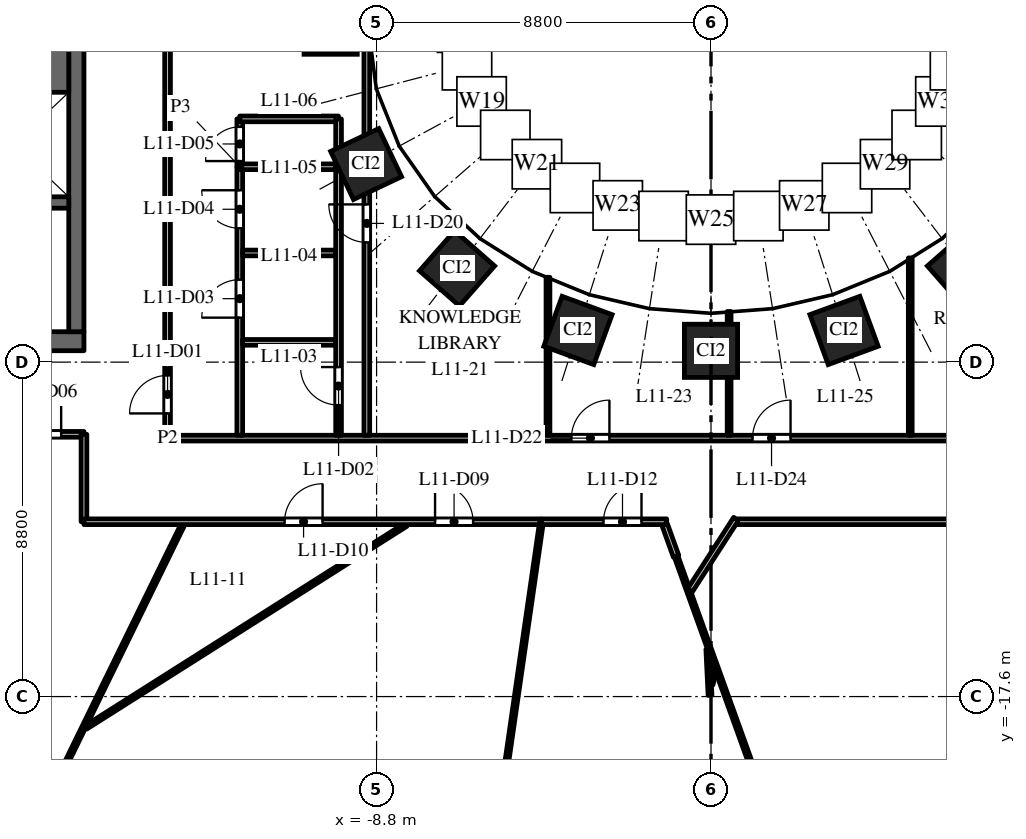
"""IFC4 building model, lengths in metres.
Left out: names, types, materials, properties, quantities, classifications, styles, units other than length and angle.
Written with IfcOpenShell. Run it as: python <this file> out.ifc"""

import sys

from ifc_helpers import new_model, si_unit, direction, frame, frame_2d, origin, origin_2d, place, context, subcontext, project, spatial, rectangle, extrude, element, fill, save


model = new_model("IFC4")
c1 = context("Model", 3, precision=1e-05, world=origin(), true_north=direction((0.0, 1.0)))
c2 = subcontext(c1, "Body", "Model", "MODEL_VIEW")
j1 = project(units=[si_unit("LENGTHUNIT", "METRE"), si_unit("PLANEANGLEUNIT", "RADIAN")], contexts=[c1])
p1 = place(None, origin())
s1 = spatial("IfcSite", under=j1, at=p1, CompositionType="ELEMENT")
p2 = place(p1, origin())
s2 = spatial("IfcBuilding", under=s1, at=p2, CompositionType="ELEMENT")
p3 = place(p2, frame((0.0, 0.0, 54.5)))
s3 = spatial("IfcBuildingStorey", under=s2, at=p3, CompositionType="ELEMENT", Elevation=54.5)
for number, where, z_axis, x_axis in (
    (1, (-10.008, 0.0, 0.0), (0.0, 0.0, 1.0), (0.0, -1.0, 0.0)),
    (2, (-9.076, -3.588, 0.0), (0.0, 0.0, 1.0), (0.429, -0.903, 0.0)),
    (3, (-6.682, -6.334, 0.0), (0.0, 0.0, 1.0), (0.751, -0.66, 0.0)),
    (4, (-3.501, -7.967, 0.0), (0.0, 0.0, 1.0), (0.939, -0.344, 0.0)),
    (5, (0.0, -8.503, 0.0), (0.0, 0.0, 1.0), (1.0, 0.0, 0.0)),
    (6, (3.501, -7.967, 0.0), (0.0, 0.0, 1.0), (0.939, 0.344, 0.0)),
    (7, (6.682, -6.334, 0.0), (0.0, 0.0, 1.0), (0.751, 0.66, 0.0)),
):
    element("IfcColumn", number, at=place(p3, frame(where, z_axis=z_axis, x_axis=x_axis)), inside=s3, PredefinedType="COLUMN", context=c2, shape_type="SweptSolid", body=[
        extrude(rectangle(XDim=1.4, YDim=1.4, at=origin_2d()), origin(), (0.0, 0.0, 1.0), 4.0),
    ])
p4 = place(p3, frame((-16.5, -8.25, 0.0), z_axis=(0.0, 0.0, 1.0), x_axis=(-1.0, 0.0, 0.0)))
e8 = element("IfcWall", 8, at=p4, inside=s3, PredefinedType="SHEAR", context=c2, shape_type="SweptSolid", body=[
    extrude(rectangle(XDim=15.0, YDim=0.5, at=frame_2d((7.5, 0.0))), origin(), (0.0, 0.0, 1.0), 3.7),
])
p5 = place(p4, frame((6.9, 0.0, 0.0)))
e9 = element("IfcOpeningElement", 9, at=p5, cuts=e8, PredefinedType="OPENING", context=c2, shape_type="SweptSolid", body=[
    extrude(rectangle(XDim=1.2, YDim=2.1, at=frame_2d((0.6, 1.05))), frame((0.0, 0.26, 0.0), z_axis=(0.0, -1.0, 0.0), x_axis=(1.0, 0.0, 0.0)), (0.0, 0.0, 1.0), 0.52),
])
p6 = place(p4, frame((12.05, 0.0, 0.0)))
e10 = element("IfcOpeningElement", 10, at=p6, cuts=e8, PredefinedType="OPENING", context=c2, shape_type="SweptSolid", body=[
    extrude(rectangle(XDim=0.9, YDim=2.1, at=frame_2d((0.45, 1.05))), frame((0.0, 0.26, 0.0), z_axis=(0.0, -1.0, 0.0), x_axis=(1.0, 0.0, 0.0)), (0.0, 0.0, 1.0), 0.52),
])
p7 = place(p3, frame((-16.7, -8.0, 0.0), z_axis=(0.0, 0.0, 1.0), x_axis=(0.0, 1.0, 0.0)))
e11 = element("IfcWall", 11, at=p7, inside=s3, PredefinedType="SHEAR", context=c2, shape_type="SweptSolid", body=[
    extrude(rectangle(XDim=16.0, YDim=0.4, at=frame_2d((8.0, 0.0))), origin(), (0.0, 0.0, 1.0), 3.7),
])
p8 = place(p3, frame((-16.9, -1.075, 0.0), z_axis=(0.0, 0.0, 1.0), x_axis=(-1.0, 0.0, 0.0)))
e12 = element("IfcWall", 12, at=p8, inside=s3, PredefinedType="SHEAR", context=c2, shape_type="SweptSolid", body=[
    extrude(rectangle(XDim=2.9, YDim=1.25, at=frame_2d((1.45, 0.0))), origin(), (0.0, 0.0, 1.0), 3.7),
])
p9 = place(p3, frame((-16.9, -4.6, 0.0), z_axis=(0.0, 0.0, 1.0), x_axis=(-1.0, 0.0, 0.0)))
e13 = element("IfcWall", 13, at=p9, inside=s3, PredefinedType="SHEAR", context=c2, shape_type="SweptSolid", body=[
    extrude(rectangle(XDim=6.18, YDim=0.3, at=frame_2d((3.09, 0.0))), origin(), (0.0, 0.0, 1.0), 3.7),
])
p10 = place(p9, frame((4.9, 0.0, 0.0)))
e14 = element("IfcOpeningElement", 14, at=p10, cuts=e13, PredefinedType="OPENING", context=c2, shape_type="SweptSolid", body=[
    extrude(rectangle(XDim=1.1, YDim=2.1, at=frame_2d((0.55, 1.05))), frame((0.0, 0.16, 0.0), z_axis=(0.0, -1.0, 0.0), x_axis=(1.0, 0.0, 0.0)), (0.0, 0.0, 1.0), 0.32),
])
p11 = place(p3, frame((-31.5, -10.7, 0.0), z_axis=(0.0, 0.0, 1.0), x_axis=(1.0, 0.0, 0.0)))
e15 = element("IfcWall", 15, at=p11, inside=s3, PredefinedType="PARTITIONING", context=c2, shape_type="SweptSolid", body=[
    extrude(rectangle(XDim=15.0, YDim=0.15, at=frame_2d((7.5, 0.0))), origin(), (0.0, 0.0, 1.0), 3.1),
])
p12 = place(p11, frame((13.4, 0.0, 0.0)))
e16 = element("IfcOpeningElement", 16, at=p12, cuts=e15, PredefinedType="OPENING", context=c2, shape_type="SweptSolid", body=[
    extrude(rectangle(XDim=1.0, YDim=2.1, at=frame_2d((0.5, 1.05))), frame((0.0, 0.085, 0.0), z_axis=(0.0, -1.0, 0.0), x_axis=(1.0, 0.0, 0.0)), (0.0, 0.0, 1.0), 0.17),
])
p13 = place(p3, frame((-19.086, -23.685, 0.0), z_axis=(0.0, 0.0, 1.0), x_axis=(0.439199750603, 0.898389436197, 0.0)))
e17 = element("IfcWall", 17, at=p13, inside=s3, PredefinedType="PARTITIONING", context=c2, shape_type="SweptSolid", body=[
    extrude(rectangle(XDim=11.81, YDim=0.1, at=frame_2d((5.905, 0.0))), origin(), (0.0, 0.0, 1.0), 3.7),
])
p14 = place(p3, frame((-16.452, -18.412, 0.0), z_axis=(0.0, 0.0, 1.0), x_axis=(0.84481391066, 0.535060236194, 0.0)))
e18 = element("IfcWall", 18, at=p14, inside=s3, PredefinedType="PARTITIONING", context=c2, shape_type="SweptSolid", body=[
    extrude(rectangle(XDim=9.971, YDim=0.1, at=frame_2d((4.986, 0.0))), origin(), (0.0, 0.0, 1.0), 2.85),
])
p15 = place(p3, frame((-16.5, -13.0, 0.0), z_axis=(0.0, 0.0, 1.0), x_axis=(0.0, 1.0, 0.0)))
e19 = element("IfcWall", 19, at=p15, inside=s3, PredefinedType="PARTITIONING", context=c2, shape_type="SweptSolid", body=[
    extrude(rectangle(XDim=2.3, YDim=0.15, at=frame_2d((1.15, 0.0))), origin(), (0.0, 0.0, 1.0), 2.75),
])
p16 = place(p3, frame((-16.5, -13.0, 0.0), z_axis=(0.0, 0.0, 1.0), x_axis=(1.0, 0.0, 0.0)))
e20 = element("IfcWall", 20, at=p16, inside=s3, PredefinedType="PARTITIONING", context=c2, shape_type="SweptSolid", body=[
    extrude(rectangle(XDim=12.021, YDim=0.15, at=frame_2d((6.01, 0.0))), origin(), (0.0, 0.0, 1.0), 2.85),
])
p17 = place(p16, frame((9.239, 0.0, 0.0)))
e21 = element("IfcOpeningElement", 21, at=p17, cuts=e20, PredefinedType="OPENING", context=c2, shape_type="SweptSolid", body=[
    extrude(rectangle(XDim=1.0, YDim=2.1, at=frame_2d((0.5, 1.05))), frame((0.0, 0.085, 0.0), z_axis=(0.0, -1.0, 0.0), x_axis=(1.0, 0.0, 0.0)), (0.0, 0.0, 1.0), 0.17),
])
p18 = place(p16, frame((5.279, 0.0, 0.0)))
e22 = element("IfcOpeningElement", 22, at=p18, cuts=e20, PredefinedType="OPENING", context=c2, shape_type="SweptSolid", body=[
    extrude(rectangle(XDim=1.0, YDim=2.1, at=frame_2d((0.5, 1.05))), frame((0.0, 0.085, 0.0), z_axis=(0.0, -1.0, 0.0), x_axis=(1.0, 0.0, 0.0)), (0.0, 0.0, 1.0), 0.17),
])
p19 = place(p3, frame((-14.3, -10.8, 0.0), z_axis=(0.0, 0.0, 1.0), x_axis=(0.0, 1.0, 0.0)))
e23 = element("IfcWall", 23, at=p19, inside=s3, PredefinedType="PARTITIONING", context=c2, shape_type="SweptSolid", body=[
    extrude(rectangle(XDim=21.6, YDim=0.15, at=frame_2d((10.8, 0.0))), origin(), (0.0, 0.0, 1.0), 2.75),
])
p20 = place(p19, frame((0.65, 0.0, 0.0)))
e24 = element("IfcOpeningElement", 24, at=p20, cuts=e23, PredefinedType="OPENING", context=c2, shape_type="SweptSolid", body=[
    extrude(rectangle(XDim=1.0, YDim=2.1, at=frame_2d((0.5, 1.05))), frame((0.0, 0.085, 0.0), z_axis=(0.0, -1.0, 0.0), x_axis=(1.0, 0.0, 0.0)), (0.0, 0.0, 1.0), 0.17),
])
p21 = place(p3, frame((-14.3, -10.8, 0.0), z_axis=(0.0, 0.0, 1.0), x_axis=(1.0, 0.0, 0.0)))
e25 = element("IfcWall", 25, at=p21, inside=s3, PredefinedType="PARTITIONING", context=c2, shape_type="SweptSolid", body=[
    extrude(rectangle(XDim=28.6, YDim=0.15, at=frame_2d((14.3, 0.0))), origin(), (0.0, 0.0, 1.0), 2.85),
])
p22 = place(p21, frame((10.627, 0.0, 0.0)))
e26 = element("IfcOpeningElement", 26, at=p22, cuts=e25, PredefinedType="OPENING", context=c2, shape_type="SweptSolid", body=[
    extrude(rectangle(XDim=1.0, YDim=2.1, at=frame_2d((0.5, 1.05))), frame((0.0, 0.085, 0.0), z_axis=(0.0, -1.0, 0.0), x_axis=(1.0, 0.0, 0.0)), (0.0, 0.0, 1.0), 0.17),
])
p23 = place(p21, frame((15.393, 0.0, 0.0)))
e27 = element("IfcOpeningElement", 27, at=p23, cuts=e25, PredefinedType="OPENING", context=c2, shape_type="SweptSolid", body=[
    extrude(rectangle(XDim=1.0, YDim=2.1, at=frame_2d((0.5, 1.05))), frame((0.0, 0.085, 0.0), z_axis=(0.0, -1.0, 0.0), x_axis=(1.0, 0.0, 0.0)), (0.0, 0.0, 1.0), 0.17),
])
p24 = place(p3, frame((-12.4, -10.725, 0.0), z_axis=(0.0, 0.0, 1.0), x_axis=(0.0, 1.0, 0.0)))
e28 = element("IfcWall", 28, at=p24, inside=s3, PredefinedType="PARTITIONING", context=c2, shape_type="SweptSolid", body=[
    extrude(rectangle(XDim=7.065, YDim=0.15, at=frame_2d((3.533, 0.0))), origin(), (0.0, 0.0, 1.0), 2.75),
])
p25 = place(p24, frame((3.095, 0.0, 0.0)))
e29 = element("IfcOpeningElement", 29, at=p25, cuts=e28, PredefinedType="OPENING", context=c2, shape_type="SweptSolid", body=[
    extrude(rectangle(XDim=1.0, YDim=2.1, at=frame_2d((0.5, 1.05))), frame((0.0, 0.085, 0.0), z_axis=(0.0, -1.0, 0.0), x_axis=(1.0, 0.0, 0.0)), (0.0, 0.0, 1.0), 0.17),
])
p26 = place(p24, frame((5.447, 0.0, 0.0)))
e30 = element("IfcOpeningElement", 30, at=p26, cuts=e28, PredefinedType="OPENING", context=c2, shape_type="SweptSolid", body=[
    extrude(rectangle(XDim=1.0, YDim=2.1, at=frame_2d((0.5, 1.05))), frame((0.0, 0.085, 0.0), z_axis=(0.0, -1.0, 0.0), x_axis=(1.0, 0.0, 0.0)), (0.0, 0.0, 1.0), 0.17),
])
p27 = place(p3, frame((-12.325, -8.28, 0.0), z_axis=(0.0, 0.0, 1.0), x_axis=(1.0, 0.0, 0.0)))
e31 = element("IfcWall", 31, at=p27, inside=s3, PredefinedType="PARTITIONING", context=c2, shape_type="SweptSolid", body=[
    extrude(rectangle(XDim=2.45, YDim=0.15, at=frame_2d((1.225, 0.0))), origin(), (0.0, 0.0, 1.0), 2.75),
])
p28 = place(p3, frame((-12.325, -5.928, 0.0), z_axis=(0.0, 0.0, 1.0), x_axis=(1.0, 0.0, 0.0)))
e32 = element("IfcWall", 32, at=p28, inside=s3, PredefinedType="PARTITIONING", context=c2, shape_type="SweptSolid", body=[
    extrude(rectangle(XDim=2.45, YDim=0.15, at=frame_2d((1.225, 0.0))), origin(), (0.0, 0.0, 1.0), 3.7),
])
p29 = place(p3, frame((-12.4, -3.66, 0.0), z_axis=(0.0, 0.0, 1.0), x_axis=(0.0, 1.0, 0.0)))
e33 = element("IfcWall", 33, at=p29, inside=s3, PredefinedType="PARTITIONING", context=c2, shape_type="SweptSolid", body=[
    extrude(rectangle(XDim=1.26, YDim=0.15, at=frame_2d((0.63, 0.0))), origin(), (0.0, 0.0, 1.0), 3.7),
])
p30 = place(p29, frame((0.15, 0.0, 0.0)))
e34 = element("IfcOpeningElement", 34, at=p30, cuts=e33, PredefinedType="OPENING", context=c2, shape_type="SweptSolid", body=[
    extrude(rectangle(XDim=0.9, YDim=2.1, at=frame_2d((0.45, 1.05))), frame((0.0, 0.085, 0.0), z_axis=(0.0, -1.0, 0.0), x_axis=(1.0, 0.0, 0.0)), (0.0, 0.0, 1.0), 0.17),
])
p31 = place(p3, frame((-12.4, -3.66, 0.0), z_axis=(0.0, 0.0, 1.0), x_axis=(1.0, 0.0, 0.0)))
e35 = element("IfcWall", 35, at=p31, inside=s3, PredefinedType="PARTITIONING", context=c2, shape_type="SweptSolid", body=[
    extrude(rectangle(XDim=2.6, YDim=0.15, at=frame_2d((1.3, 0.0))), origin(), (0.0, 0.0, 1.0), 3.7),
])
p32 = place(p3, frame((-12.4, -2.4, 0.0), z_axis=(0.0, 0.0, 1.0), x_axis=(1.0, 0.0, 0.0)))
e36 = element("IfcWall", 36, at=p32, inside=s3, PredefinedType="PARTITIONING", context=c2, shape_type="SweptSolid", body=[
    extrude(rectangle(XDim=2.596, YDim=0.15, at=frame_2d((1.298, 0.0))), origin(), (0.0, 0.0, 1.0), 3.7),
])
p33 = place(p3, frame((-9.8, -10.725, 0.0), z_axis=(0.0, 0.0, 1.0), x_axis=(0.0, 1.0, 0.0)))
e37 = element("IfcWall", 37, at=p33, inside=s3, PredefinedType="PARTITIONING", context=c2, shape_type="SweptSolid", body=[
    extrude(rectangle(XDim=7.065, YDim=0.15, at=frame_2d((3.533, 0.0))), origin(), (0.0, 0.0, 1.0), 2.75),
])
p34 = place(p33, frame((0.795, 0.0, 0.0)))
e38 = element("IfcOpeningElement", 38, at=p34, cuts=e37, PredefinedType="OPENING", context=c2, shape_type="SweptSolid", body=[
    extrude(rectangle(XDim=1.0, YDim=2.1, at=frame_2d((0.5, 1.05))), frame((0.0, 0.085, 0.0), z_axis=(0.0, -1.0, 0.0), x_axis=(1.0, 0.0, 0.0)), (0.0, 0.0, 1.0), 0.17),
])
p35 = place(p3, frame((-9.8, -3.66, 0.0), z_axis=(0.0, 0.0, 1.0), x_axis=(0.0, 1.0, 0.0)))
e39 = element("IfcWall", 39, at=p35, inside=s3, PredefinedType="PARTITIONING", context=c2, shape_type="SweptSolid", body=[
    extrude(rectangle(XDim=1.256, YDim=0.15, at=frame_2d((0.628, 0.0))), origin(), (0.0, 0.0, 1.0), 3.7),
])
p36 = place(p3, frame((-9.057, -10.725, 0.0), z_axis=(0.0, 0.0, 1.0), x_axis=(0.0, 1.0, 0.0)))
e40 = element("IfcWall", 40, at=p36, inside=s3, PredefinedType="PARTITIONING", context=c2, shape_type="SweptSolid", body=[
    extrude(rectangle(XDim=10.68, YDim=0.15, at=frame_2d((5.34, 0.0))), origin(), (0.0, 0.0, 1.0), 2.75),
])
p37 = place(p36, frame((5.075, 0.0, 0.0)))
e41 = element("IfcOpeningElement", 41, at=p37, cuts=e40, PredefinedType="OPENING", context=c2, shape_type="SweptSolid", body=[
    extrude(rectangle(XDim=1.0, YDim=2.1, at=frame_2d((0.5, 1.05))), frame((0.0, 0.085, 0.0), z_axis=(0.0, -1.0, 0.0), x_axis=(1.0, 0.0, 0.0)), (0.0, 0.0, 1.0), 0.17),
])
p38 = place(p3, frame((-5.905, -23.005, 0.0), z_axis=(0.0, 0.0, 1.0), x_axis=(0.143007570509, 0.98972159458, 0.0)))
e42 = element("IfcWall", 42, at=p38, inside=s3, PredefinedType="PARTITIONING", context=c2, shape_type="SweptSolid", body=[
    extrude(rectangle(XDim=10.105, YDim=0.1, at=frame_2d((5.052, 0.0))), origin(), (0.0, 0.0, 1.0), 3.7),
])
p39 = place(p3, frame((-4.459, -13.0, 0.0), z_axis=(0.0, 0.0, 1.0), x_axis=(1.0, 0.0, 0.0)))
e43 = element("IfcWall", 43, at=p39, inside=s3, PredefinedType="PARTITIONING", context=c2, shape_type="SweptSolid", body=[
    extrude(rectangle(XDim=3.293, YDim=0.15, at=frame_2d((1.646, 0.0))), origin(), (0.0, 0.0, 1.0), 3.7),
])
p40 = place(p39, frame((1.63, 0.0, 0.0)))
e44 = element("IfcOpeningElement", 44, at=p40, cuts=e43, PredefinedType="OPENING", context=c2, shape_type="SweptSolid", body=[
    extrude(rectangle(XDim=1.0, YDim=2.1, at=frame_2d((0.5, 1.05))), frame((0.0, 0.085, 0.0), z_axis=(0.0, -1.0, 0.0), x_axis=(1.0, 0.0, 0.0)), (0.0, 0.0, 1.0), 0.17),
])
p41 = place(p3, frame((-4.29, -10.725, 0.0), z_axis=(0.0, 0.0, 1.0), x_axis=(0.0, 1.0, 0.0)))
e45 = element("IfcWall", 45, at=p41, inside=s3, PredefinedType="PARTITIONING", context=c2, shape_type="SweptSolid", body=[
    extrude(rectangle(XDim=4.157, YDim=0.1, at=frame_2d((2.079, 0.0))), origin(), (0.0, 0.0, 1.0), 2.85),
])
p42 = place(p3, frame((-1.218, -13.079, 0.0), z_axis=(0.0, 0.0, 1.0), x_axis=(0.339052677967, -0.940767389722, 0.0)))
e46 = element("IfcWall", 46, at=p42, inside=s3, PredefinedType="PARTITIONING", context=c2, shape_type="SweptSolid", body=[
    extrude(rectangle(XDim=0.882, YDim=0.15, at=frame_2d((0.441, 0.0))), origin(), (0.0, 0.0, 1.0), 2.85),
])
p43 = place(p3, frame((-0.916, -13.918, 0.0), z_axis=(0.0, 0.0, 1.0), x_axis=(0.338982154044, -0.940792803565, 0.0)))
e47 = element("IfcWall", 47, at=p43, inside=s3, PredefinedType="PARTITIONING", context=c2, shape_type="SweptSolid", body=[
    extrude(rectangle(XDim=13.526, YDim=0.1, at=frame_2d((6.763, 0.0))), origin(), (0.0, 0.0, 1.0), 2.85),
])
p44 = place(p3, frame((-0.084, -16.356, 0.0), z_axis=(0.0, 0.0, 1.0), x_axis=(0.047967320325, -0.998848905581, 0.0)))
e48 = element("IfcWall", 48, at=p44, inside=s3, PredefinedType="PARTITIONING", context=c2, shape_type="SweptSolid", body=[
    extrude(rectangle(XDim=1.211, YDim=0.1, at=frame_2d((0.606, 0.0))), origin(), (0.0, 0.0, 1.0), 3.7),
])
p45 = place(p3, frame((-0.554, -14.806, 0.0), z_axis=(0.0, 0.0, 1.0), x_axis=(0.542256038928, 0.840213299256, 0.0)))
e49 = element("IfcWall", 49, at=p45, inside=s3, PredefinedType="PARTITIONING", context=c2, shape_type="SweptSolid", body=[
    extrude(rectangle(XDim=2.239, YDim=0.15, at=frame_2d((1.119, 0.0))), origin(), (0.0, 0.0, 1.0), 3.7),
])
p46 = place(p3, frame((0.002, -17.284, 0.0), z_axis=(0.0, 0.0, 1.0), x_axis=(0.240121592304, 0.970742819139, 0.0)))
e50 = element("IfcWall", 50, at=p46, inside=s3, PredefinedType="PARTITIONING", context=c2, shape_type="SweptSolid", body=[
    extrude(rectangle(XDim=0.405, YDim=0.1, at=frame_2d((0.202, 0.0))), origin(), (0.0, 0.0, 1.0), 3.7),
])
p47 = place(p3, frame((0.477, -10.725, 0.0), z_axis=(0.0, 0.0, 1.0), x_axis=(0.0, 1.0, 0.0)))
e51 = element("IfcWall", 51, at=p47, inside=s3, PredefinedType="PARTITIONING", context=c2, shape_type="SweptSolid", body=[
    extrude(rectangle(XDim=3.257, YDim=0.1, at=frame_2d((1.628, 0.0))), origin(), (0.0, 0.0, 1.0), 2.85),
])
p48 = place(p3, frame((0.701, -13.0, 0.0), z_axis=(0.0, 0.0, 1.0), x_axis=(1.0, 0.0, 0.0)))
e52 = element("IfcWall", 52, at=p48, inside=s3, PredefinedType="PARTITIONING", context=c2, shape_type="SweptSolid", body=[
    extrude(rectangle(XDim=15.799, YDim=0.15, at=frame_2d((7.899, 0.0))), origin(), (0.0, 0.0, 1.0), 2.85),
])
p49 = place(p48, frame((11.561, 0.0, 0.0)))
e53 = element("IfcOpeningElement", 53, at=p49, cuts=e52, PredefinedType="OPENING", context=c2, shape_type="SweptSolid", body=[
    extrude(rectangle(XDim=1.0, YDim=2.1, at=frame_2d((0.5, 1.05))), frame((0.0, 0.085, 0.0), z_axis=(0.0, -1.0, 0.0), x_axis=(1.0, 0.0, 0.0)), (0.0, 0.0, 1.0), 0.17),
])
p50 = place(p3, frame((5.243, -10.725, 0.0), z_axis=(0.0, 0.0, 1.0), x_axis=(0.0, 1.0, 0.0)))
e54 = element("IfcWall", 54, at=p50, inside=s3, PredefinedType="PARTITIONING", context=c2, shape_type="SweptSolid", body=[
    extrude(rectangle(XDim=4.666, YDim=0.1, at=frame_2d((2.333, 0.0))), origin(), (0.0, 0.0, 1.0), 2.85),
])
p51 = place(p20, origin())
e55 = element("IfcDoor", 55, at=p51, inside=s3, OperationType="SINGLE_SWING_LEFT", PredefinedType="DOOR", context=c2, shape_type="SweptSolid", body=[
    extrude(rectangle(XDim=1.0, YDim=2.1, at=frame_2d((0.5, 1.05))), frame((0.0, 0.025, 0.0), z_axis=(0.0, -1.0, 0.0), x_axis=(1.0, 0.0, 0.0)), (0.0, 0.0, 1.0), 0.05),
])
fill(e24, e55)
p52 = place(p34, origin())
e56 = element("IfcDoor", 56, at=p52, inside=s3, OperationType="SINGLE_SWING_RIGHT", PredefinedType="DOOR", context=c2, shape_type="SweptSolid", body=[
    extrude(rectangle(XDim=1.0, YDim=2.1, at=frame_2d((0.5, 1.05))), frame((0.0, 0.025, 0.0), z_axis=(0.0, -1.0, 0.0), x_axis=(1.0, 0.0, 0.0)), (0.0, 0.0, 1.0), 0.05),
])
fill(e38, e56)
p53 = place(p25, origin())
e57 = element("IfcDoor", 57, at=p53, inside=s3, OperationType="SINGLE_SWING_LEFT", PredefinedType="DOOR", context=c2, shape_type="SweptSolid", body=[
    extrude(rectangle(XDim=1.0, YDim=2.1, at=frame_2d((0.5, 1.05))), frame((0.0, 0.025, 0.0), z_axis=(0.0, -1.0, 0.0), x_axis=(1.0, 0.0, 0.0)), (0.0, 0.0, 1.0), 0.05),
])
fill(e29, e57)
p54 = place(p26, origin())
e58 = element("IfcDoor", 58, at=p54, inside=s3, OperationType="SINGLE_SWING_RIGHT", PredefinedType="DOOR", context=c2, shape_type="SweptSolid", body=[
    extrude(rectangle(XDim=1.0, YDim=2.1, at=frame_2d((0.5, 1.05))), frame((0.0, 0.025, 0.0), z_axis=(0.0, -1.0, 0.0), x_axis=(1.0, 0.0, 0.0)), (0.0, 0.0, 1.0), 0.05),
])
fill(e30, e58)
p55 = place(p30, origin())
e59 = element("IfcDoor", 59, at=p55, inside=s3, OperationType="SINGLE_SWING_LEFT", PredefinedType="DOOR", context=c2, shape_type="SweptSolid", body=[
    extrude(rectangle(XDim=0.9, YDim=2.1, at=frame_2d((0.45, 1.05))), frame((0.0, 0.025, 0.0), z_axis=(0.0, -1.0, 0.0), x_axis=(1.0, 0.0, 0.0)), (0.0, 0.0, 1.0), 0.05),
])
fill(e34, e59)
p56 = place(p12, origin())
e60 = element("IfcDoor", 60, at=p56, inside=s3, OperationType="SINGLE_SWING_RIGHT", PredefinedType="DOOR", context=c2, shape_type="SweptSolid", body=[
    extrude(rectangle(XDim=1.0, YDim=2.1, at=frame_2d((0.5, 1.05))), frame((0.0, 0.025, 0.0), z_axis=(0.0, -1.0, 0.0), x_axis=(1.0, 0.0, 0.0)), (0.0, 0.0, 1.0), 0.05),
])
fill(e16, e60)
p57 = place(p17, origin())
e61 = element("IfcDoor", 61, at=p57, inside=s3, OperationType="SINGLE_SWING_LEFT", PredefinedType="DOOR", context=c2, shape_type="SweptSolid", body=[
    extrude(rectangle(XDim=1.0, YDim=2.1, at=frame_2d((0.5, 1.05))), frame((0.0, 0.025, 0.0), z_axis=(0.0, -1.0, 0.0), x_axis=(1.0, 0.0, 0.0)), (0.0, 0.0, 1.0), 0.05),
])
fill(e21, e61)
p58 = place(p18, origin())
e62 = element("IfcDoor", 62, at=p58, inside=s3, OperationType="SINGLE_SWING_RIGHT", PredefinedType="DOOR", context=c2, shape_type="SweptSolid", body=[
    extrude(rectangle(XDim=1.0, YDim=2.1, at=frame_2d((0.5, 1.05))), frame((0.0, 0.025, 0.0), z_axis=(0.0, -1.0, 0.0), x_axis=(1.0, 0.0, 0.0)), (0.0, 0.0, 1.0), 0.05),
])
fill(e22, e62)
p59 = place(p40, origin())
e63 = element("IfcDoor", 63, at=p59, inside=s3, OperationType="SINGLE_SWING_RIGHT", PredefinedType="DOOR", context=c2, shape_type="SweptSolid", body=[
    extrude(rectangle(XDim=1.0, YDim=2.1, at=frame_2d((0.5, 1.05))), frame((0.0, 0.025, 0.0), z_axis=(0.0, -1.0, 0.0), x_axis=(1.0, 0.0, 0.0)), (0.0, 0.0, 1.0), 0.05),
])
fill(e44, e63)
p60 = place(p37, origin())
e64 = element("IfcDoor", 64, at=p60, inside=s3, OperationType="SINGLE_SWING_RIGHT", PredefinedType="DOOR", context=c2, shape_type="SweptSolid", body=[
    extrude(rectangle(XDim=1.0, YDim=2.1, at=frame_2d((0.5, 1.05))), frame((0.0, 0.025, 0.0), z_axis=(0.0, -1.0, 0.0), x_axis=(1.0, 0.0, 0.0)), (0.0, 0.0, 1.0), 0.05),
])
fill(e41, e64)
p61 = place(p22, origin())
e65 = element("IfcDoor", 65, at=p61, inside=s3, OperationType="SINGLE_SWING_RIGHT", PredefinedType="DOOR", context=c2, shape_type="SweptSolid", body=[
    extrude(rectangle(XDim=1.0, YDim=2.1, at=frame_2d((0.5, 1.05))), frame((0.0, 0.025, 0.0), z_axis=(0.0, -1.0, 0.0), x_axis=(1.0, 0.0, 0.0)), (0.0, 0.0, 1.0), 0.05),
])
fill(e26, e65)
p62 = place(p23, origin())
e66 = element("IfcDoor", 66, at=p62, inside=s3, OperationType="SINGLE_SWING_RIGHT", PredefinedType="DOOR", context=c2, shape_type="SweptSolid", body=[
    extrude(rectangle(XDim=1.0, YDim=2.1, at=frame_2d((0.5, 1.05))), frame((0.0, 0.025, 0.0), z_axis=(0.0, -1.0, 0.0), x_axis=(1.0, 0.0, 0.0)), (0.0, 0.0, 1.0), 0.05),
])
fill(e27, e66)
save(model, sys.argv[1])
